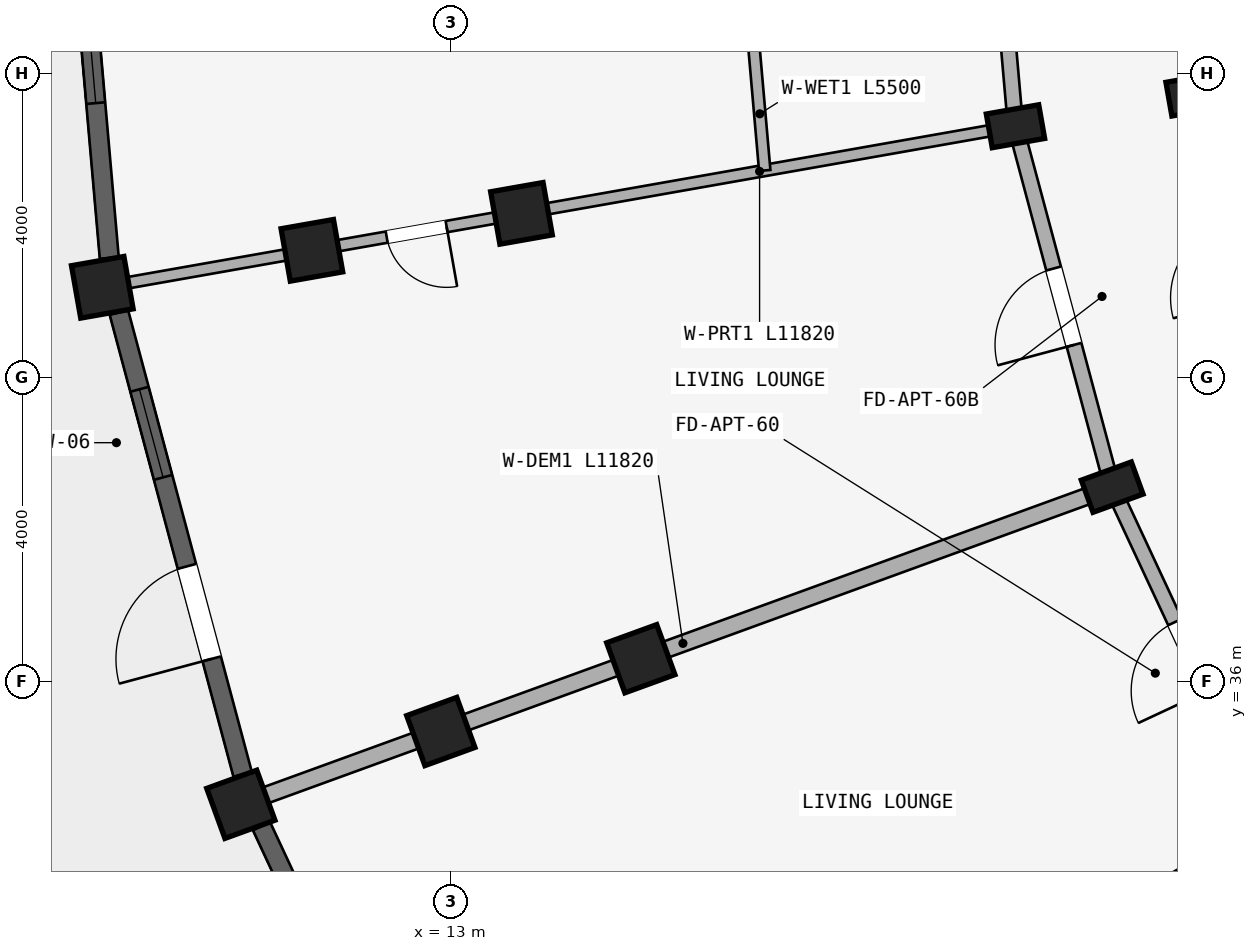
"""IFC4 building model, lengths in metres.
Left out: names, types, materials, properties, quantities, classifications, styles, units other than length and angle.
Written with IfcOpenShell. Run it as: python <this file> out.ifc"""

import sys

from ifc_helpers import new_model, si_unit, direction, frame, frame_2d, origin, origin_2d, place, context, subcontext, project, spatial, rectangle, extrude, element, fill, save


model = new_model("IFC4")
c1 = context("Model", 3, precision=1e-05, world=origin(), true_north=direction((0.0, 1.0)))
c2 = subcontext(c1, "Body", "Model", "MODEL_VIEW")
j1 = project(units=[si_unit("LENGTHUNIT", "METRE"), si_unit("PLANEANGLEUNIT", "RADIAN")], contexts=[c1])
p1 = place(None, origin())
s1 = spatial("IfcSite", under=j1, at=p1, CompositionType="ELEMENT")
p2 = place(p1, origin())
s2 = spatial("IfcBuilding", under=s1, at=p2, CompositionType="ELEMENT")
p3 = place(p2, frame((0.0, 0.0, 24.45)))
s3 = spatial("IfcBuildingStorey", under=s2, at=p3, CompositionType="ELEMENT", Elevation=24.45)
p4 = place(p3, frame((21.701, 38.555, 0.0), z_axis=(0.0, 0.0, 1.0), x_axis=(-0.342020143326, 0.939692620786, 0.0)))
e1 = element("IfcColumn", 1, at=p4, inside=s3, PredefinedType="COLUMN", context=c2, shape_type="SweptSolid", body=[
    extrude(rectangle(XDim=0.45, YDim=0.7, at=origin_2d()), origin(), (0.0, 0.0, 1.0), 2.93),
])
for number, where, z_axis, x_axis in (
    (2, (15.499, 36.298, 0.0), (0.0, 0.0, 1.0), (-0.342, 0.94, 0.0)),
    (3, (12.868, 35.34, 0.0), (0.0, 0.0, 1.0), (-0.342, 0.94, 0.0)),
):
    element("IfcColumn", number, at=place(p3, frame(where, z_axis=z_axis, x_axis=x_axis)), inside=s3, PredefinedType="COLUMN", context=c2, shape_type="SweptSolid", body=[
        extrude(rectangle(XDim=0.7, YDim=0.7, at=origin_2d()), origin(), (0.0, 0.0, 1.0), 2.93),
    ])
p5 = place(p3, frame((10.236, 34.382, 0.0), z_axis=(0.0, 0.0, 1.0), x_axis=(-0.342020143326, 0.939692620786, 0.0)))
e4 = element("IfcColumn", 4, at=p5, inside=s3, PredefinedType="COLUMN", context=c2, shape_type="SweptSolid", body=[
    extrude(rectangle(XDim=0.7, YDim=0.7, at=origin_2d()), origin(), (0.0, 0.0, 1.0), 2.97),
])
for number, where, z_axis, x_axis in (
    (5, (22.792, 43.72, 0.0), (0.0, 0.0, 1.0), (-0.174, 0.985, 0.0)),
    (6, (20.428, 43.303, 0.0), (0.0, 0.0, 1.0), (-0.174, 0.985, 0.0)),
):
    element("IfcColumn", number, at=place(p3, frame(where, z_axis=z_axis, x_axis=x_axis)), inside=s3, PredefinedType="COLUMN", context=c2, shape_type="SweptSolid", body=[
        extrude(rectangle(XDim=0.45, YDim=0.7, at=origin_2d()), origin(), (0.0, 0.0, 1.0), 2.93),
    ])
for number, where, z_axis, x_axis in (
    (7, (13.929, 42.157, 0.0), (0.0, 0.0, 1.0), (-0.174, 0.985, 0.0)),
    (8, (11.171, 41.671, 0.0), (0.0, 0.0, 1.0), (-0.174, 0.985, 0.0)),
):
    element("IfcColumn", number, at=place(p3, frame(where, z_axis=z_axis, x_axis=x_axis)), inside=s3, PredefinedType="COLUMN", context=c2, shape_type="SweptSolid", body=[
        extrude(rectangle(XDim=0.7, YDim=0.7, at=origin_2d()), origin(), (0.0, 0.0, 1.0), 2.93),
    ])
p6 = place(p3, frame((8.414, 41.185, 0.0), z_axis=(0.0, 0.0, 1.0), x_axis=(-0.173648177667, 0.984807753012, 0.0)))
e9 = element("IfcColumn", 9, at=p6, inside=s3, PredefinedType="COLUMN", context=c2, shape_type="SweptSolid", body=[
    extrude(rectangle(XDim=0.7, YDim=0.7, at=origin_2d()), origin(), (0.0, 0.0, 1.0), 2.97),
])
p7 = place(p3, frame((23.778, 34.1, 0.0), z_axis=(0.0, 0.0, 1.0), x_axis=(-0.422629854778, 0.906302381024, 0.0)))
e10 = element("IfcWall", 10, at=p7, inside=s3, PredefinedType="STANDARD", context=c2, shape_type="SweptSolid", body=[
    extrude(rectangle(XDim=4.915, YDim=0.2, at=frame_2d((2.458, 0.0))), origin(), (0.0, 0.0, 1.0), 2.372),
])
p8 = place(p7, frame((1.958, 0.0, 0.0)))
e11 = element("IfcOpeningElement", 11, at=p8, cuts=e10, PredefinedType="OPENING", context=c2, shape_type="SweptSolid", body=[
    extrude(rectangle(XDim=1.0, YDim=2.15, at=frame_2d((0.5, 1.075))), frame((0.0, 0.11, 0.0), z_axis=(0.0, -1.0, 0.0), x_axis=(1.0, 0.0, 0.0)), (0.0, 0.0, 1.0), 0.22),
])
p9 = place(p3, frame((21.701, 38.555, 0.0), z_axis=(0.0, 0.0, 1.0), x_axis=(-0.258803112091, 0.965930095386, 0.0)))
e12 = element("IfcWall", 12, at=p9, inside=s3, PredefinedType="STANDARD", context=c2, shape_type="SweptSolid", body=[
    extrude(rectangle(XDim=4.916, YDim=0.2, at=frame_2d((2.458, 0.0))), origin(), (0.0, 0.0, 1.0), 2.372),
])
p10 = place(p9, frame((1.938, 0.0, 0.0)))
e13 = element("IfcOpeningElement", 13, at=p10, cuts=e12, PredefinedType="OPENING", context=c2, shape_type="SweptSolid", body=[
    extrude(rectangle(XDim=1.04, YDim=2.15, at=frame_2d((0.52, 1.075))), frame((0.0, 0.11, 0.0), z_axis=(0.0, -1.0, 0.0), x_axis=(1.0, 0.0, 0.0)), (0.0, 0.0, 1.0), 0.22),
])
p11 = place(p3, frame((22.792, 43.72, 0.0), z_axis=(0.0, 0.0, 1.0), x_axis=(-0.087187153726, 0.996191949488, 0.0)))
e14 = element("IfcWall", 14, at=p11, inside=s3, PredefinedType="STANDARD", context=c2, shape_type="SweptSolid", body=[
    extrude(rectangle(XDim=4.497, YDim=0.2, at=frame_2d((2.249, 0.0))), origin(), (0.0, 0.0, 1.0), 2.372),
])
p12 = place(p3, frame((20.428, 43.303, 0.0), z_axis=(0.0, 0.0, 1.0), x_axis=(-0.087167566415, 0.996193663584, 0.0)))
e15 = element("IfcWall", 15, at=p12, inside=s3, PredefinedType="STANDARD", context=c2, shape_type="SweptSolid", body=[
    extrude(rectangle(XDim=4.916, YDim=0.2, at=frame_2d((2.458, 0.0))), origin(), (0.0, 0.0, 1.0), 2.372),
])
p13 = place(p3, frame((23.691, 34.05, 0.0), z_axis=(0.0, 0.0, 1.0), x_axis=(-0.866017730655, -0.500013290014, 0.0)))
e16 = element("IfcWall", 16, at=p13, inside=s3, PredefinedType="STANDARD", context=c2, shape_type="SweptSolid", body=[
    extrude(rectangle(XDim=11.82, YDim=0.22, at=frame_2d((5.91, 0.0))), origin(), (0.0, 0.0, 1.0), 2.372),
])
p14 = place(p3, frame((21.607, 38.521, 0.0), z_axis=(0.0, 0.0, 1.0), x_axis=(-0.939698102693, -0.342005081534, 0.0)))
e17 = element("IfcWall", 17, at=p14, inside=s3, PredefinedType="STANDARD", context=c2, shape_type="SweptSolid", body=[
    extrude(rectangle(XDim=11.82, YDim=0.22, at=frame_2d((5.91, 0.0))), origin(), (0.0, 0.0, 1.0), 2.372),
])
p15 = place(p3, frame((20.33, 43.286, 0.0), z_axis=(0.0, 0.0, 1.0), x_axis=(-0.984808085438, -0.173646292378, 0.0)))
e18 = element("IfcWall", 18, at=p15, inside=s3, PredefinedType="PARTITIONING", context=c2, shape_type="SweptSolid", body=[
    extrude(rectangle(XDim=11.82, YDim=0.15, at=frame_2d((5.91, 0.0))), origin(), (0.0, 0.0, 1.0), 2.372),
])
p16 = place(p15, frame((7.5, 0.0, 0.0)))
e19 = element("IfcOpeningElement", 19, at=p16, cuts=e18, PredefinedType="OPENING", context=c2, shape_type="SweptSolid", body=[
    extrude(rectangle(XDim=0.8, YDim=2.1, at=frame_2d((0.4, 1.05))), frame((0.0, 0.085, 0.0), z_axis=(0.0, -1.0, 0.0), x_axis=(1.0, 0.0, 0.0)), (0.0, 0.0, 1.0), 0.17),
])
p17 = place(p3, frame((17.129, 42.721, 0.0), z_axis=(0.0, 0.0, 1.0), x_axis=(-0.087188978393, 0.996191789791, 0.0)))
e20 = element("IfcWall", 20, at=p17, inside=s3, PredefinedType="PLUMBINGWALL", context=c2, shape_type="SweptSolid", body=[
    extrude(rectangle(XDim=5.5, YDim=0.15, at=frame_2d((2.75, 0.0))), origin(), (0.0, 0.0, 1.0), 2.372),
])
p18 = place(p17, frame((2.35, 0.0, 0.0)))
e21 = element("IfcOpeningElement", 21, at=p18, cuts=e20, PredefinedType="OPENING", context=c2, shape_type="SweptSolid", body=[
    extrude(rectangle(XDim=0.8, YDim=2.1, at=frame_2d((0.4, 1.05))), frame((0.0, 0.085, 0.0), z_axis=(0.0, -1.0, 0.0), x_axis=(1.0, 0.0, 0.0)), (0.0, 0.0, 1.0), 0.17),
])
p19 = place(p3, frame((13.167, 28.394, 0.0), z_axis=(0.0, 0.0, 1.0), x_axis=(-0.42262622775, 0.906304072383, 0.0)))
e22 = element("IfcWall", 22, at=p19, inside=s3, PredefinedType="STANDARD", context=c2, shape_type="SweptSolid", body=[
    extrude(rectangle(XDim=6.29, YDim=0.25, at=frame_2d((3.145, 0.0))), origin(), (0.0, 0.0, 1.0), 2.412),
])
p20 = place(p19, frame((2.195, 0.0, 0.462)))
e23 = element("IfcOpeningElement", 23, at=p20, cuts=e22, PredefinedType="OPENING", context=c2, shape_type="SweptSolid", body=[
    extrude(rectangle(XDim=1.9, YDim=1.75, at=frame_2d((0.95, 0.875))), frame((0.0, 0.135, 0.0), z_axis=(0.0, -1.0, 0.0), x_axis=(1.0, 0.0, 0.0)), (0.0, 0.0, 1.0), 0.27),
])
p21 = place(p3, frame((10.26, 34.778, 0.0), z_axis=(0.0, 0.0, 1.0), x_axis=(-0.258792990912, 0.965932807112, 0.0)))
e24 = element("IfcWall", 24, at=p21, inside=s3, PredefinedType="STANDARD", context=c2, shape_type="SweptSolid", body=[
    extrude(rectangle(XDim=6.291, YDim=0.25, at=frame_2d((3.145, 0.0))), origin(), (0.0, 0.0, 1.0), 2.412),
])
p22 = place(p21, frame((4.043, 0.0, 0.562)))
e25 = element("IfcOpeningElement", 25, at=p22, cuts=e24, PredefinedType="OPENING", context=c2, shape_type="SweptSolid", body=[
    extrude(rectangle(XDim=1.2, YDim=1.5, at=frame_2d((0.6, 0.75))), frame((0.0, 0.135, 0.0), z_axis=(0.0, -1.0, 0.0), x_axis=(1.0, 0.0, 0.0)), (0.0, 0.0, 1.0), 0.27),
])
p23 = place(p21, frame((1.572, 0.0, 0.0)))
e26 = element("IfcOpeningElement", 26, at=p23, cuts=e24, PredefinedType="OPENING", context=c2, shape_type="SweptSolid", body=[
    extrude(rectangle(XDim=1.26, YDim=2.15, at=frame_2d((0.63, 1.075))), frame((0.0, 0.135, 0.0), z_axis=(0.0, -1.0, 0.0), x_axis=(1.0, 0.0, 0.0)), (0.0, 0.0, 1.0), 0.27),
])
p24 = place(p3, frame((8.506, 41.57, 0.0), z_axis=(0.0, 0.0, 1.0), x_axis=(-0.087168876072, 0.996193548987, 0.0)))
e27 = element("IfcWall", 27, at=p24, inside=s3, PredefinedType="STANDARD", context=c2, shape_type="SweptSolid", body=[
    extrude(rectangle(XDim=6.291, YDim=0.25, at=frame_2d((3.145, 0.0))), origin(), (0.0, 0.0, 1.0), 2.412),
])
p25 = place(p24, frame((2.045, 0.0, 0.312)))
e28 = element("IfcOpeningElement", 28, at=p25, cuts=e27, PredefinedType="OPENING", context=c2, shape_type="SweptSolid", body=[
    extrude(rectangle(XDim=2.2, YDim=1.9, at=frame_2d((1.1, 0.95))), frame((0.0, 0.135, 0.0), z_axis=(0.0, -1.0, 0.0), x_axis=(1.0, 0.0, 0.0)), (0.0, 0.0, 1.0), 0.27),
])
p26 = place(p22, origin())
e29 = element("IfcWindow", 29, at=p26, inside=s3, PartitioningType="SINGLE_PANEL", PredefinedType="WINDOW", context=c2, shape_type="SweptSolid", body=[
    extrude(rectangle(XDim=1.2, YDim=1.5, at=frame_2d((0.6, 0.75))), frame((0.0, 0.03, 0.0), z_axis=(0.0, -1.0, 0.0), x_axis=(1.0, 0.0, 0.0)), (0.0, 0.0, 1.0), 0.06),
])
fill(e25, e29)
p27 = place(p25, origin())
e30 = element("IfcWindow", 30, at=p27, inside=s3, PartitioningType="TRIPLE_PANEL_VERTICAL", PredefinedType="WINDOW", context=c2, shape_type="SweptSolid", body=[
    extrude(rectangle(XDim=2.2, YDim=1.9, at=frame_2d((1.1, 0.95))), frame((0.0, 0.03, 0.0), z_axis=(0.0, -1.0, 0.0), x_axis=(1.0, 0.0, 0.0)), (0.0, 0.0, 1.0), 0.06),
])
fill(e28, e30)
p28 = place(p16, frame((0.8, 0.0, 0.0), z_axis=(0.0, 0.0, 1.0), x_axis=(-1.0, 0.0, 0.0)))
e31 = element("IfcDoor", 31, at=p28, inside=s3, OperationType="SINGLE_SWING_RIGHT", PredefinedType="DOOR", context=c2, shape_type="SweptSolid", body=[
    extrude(rectangle(XDim=0.8, YDim=2.1, at=frame_2d((0.4, 1.05))), frame((0.0, 0.025, 0.0), z_axis=(0.0, -1.0, 0.0), x_axis=(1.0, 0.0, 0.0)), (0.0, 0.0, 1.0), 0.05),
])
fill(e19, e31)
p29 = place(p8, frame((1.0, 0.0, 0.0), z_axis=(0.0, 0.0, 1.0), x_axis=(-1.0, 0.0, 0.0)))
e32 = element("IfcDoor", 32, at=p29, inside=s3, OperationType="SINGLE_SWING_RIGHT", PredefinedType="DOOR", context=c2, shape_type="SweptSolid", body=[
    extrude(rectangle(XDim=1.0, YDim=2.15, at=frame_2d((0.5, 1.075))), frame((0.0, 0.025, 0.0), z_axis=(0.0, -1.0, 0.0), x_axis=(1.0, 0.0, 0.0)), (0.0, 0.0, 1.0), 0.05),
])
fill(e11, e32)
p30 = place(p10, origin())
e33 = element("IfcDoor", 33, at=p30, inside=s3, OperationType="SINGLE_SWING_LEFT", PredefinedType="DOOR", context=c2, shape_type="SweptSolid", body=[
    extrude(rectangle(XDim=1.04, YDim=2.15, at=frame_2d((0.52, 1.075))), frame((0.0, 0.025, 0.0), z_axis=(0.0, -1.0, 0.0), x_axis=(1.0, 0.0, 0.0)), (0.0, 0.0, 1.0), 0.05),
])
fill(e13, e33)
p31 = place(p23, origin())
e34 = element("IfcDoor", 34, at=p31, inside=s3, OperationType="SINGLE_SWING_LEFT", PredefinedType="DOOR", context=c2, shape_type="SweptSolid", body=[
    extrude(rectangle(XDim=1.26, YDim=2.15, at=frame_2d((0.63, 1.075))), frame((0.0, 0.025, 0.0), z_axis=(0.0, -1.0, 0.0), x_axis=(1.0, 0.0, 0.0)), (0.0, 0.0, 1.0), 0.05),
])
fill(e26, e34)
save(model, sys.argv[1])
